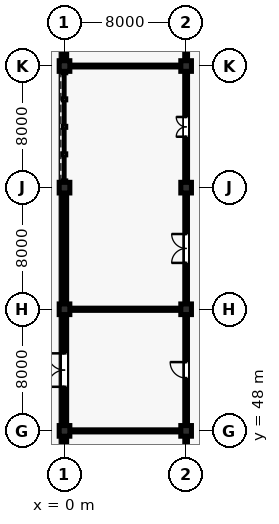
"""IFC4 building model, lengths in metres.
Left out: names, types, materials, properties, quantities, classifications, styles, units other than length and angle.
Written with IfcOpenShell. Run it as: python <this file> out.ifc"""

import sys

from ifc_helpers import new_model, si_unit, direction, frame, frame_2d, origin, origin_2d, place, context, subcontext, project, spatial, rectangle, extrude, element, fill, save


model = new_model("IFC4")
c1 = context("Model", 3, precision=1e-05, world=origin(), true_north=direction((0.0, 1.0)))
c2 = subcontext(c1, "Body", "Model", "MODEL_VIEW")
j1 = project(units=[si_unit("LENGTHUNIT", "METRE"), si_unit("PLANEANGLEUNIT", "RADIAN")], contexts=[c1])
p1 = place(None, origin())
s1 = spatial("IfcSite", under=j1, at=p1, CompositionType="ELEMENT")
p2 = place(p1, origin())
s2 = spatial("IfcBuilding", under=s1, at=p2, CompositionType="ELEMENT")
p3 = place(p2, origin())
s3 = spatial("IfcBuildingStorey", under=s2, at=p3, CompositionType="ELEMENT", Elevation=0.0)
for number, where, z_axis, x_axis in (
    (1, (0.0, 48.0, 0.0), (0.0, 0.0, 1.0), (1.0, 0.0, 0.0)),
    (2, (0.0, 56.0, 0.0), (0.0, 0.0, 1.0), (1.0, 0.0, 0.0)),
    (3, (0.0, 64.0, 0.0), (0.0, 0.0, 1.0), (1.0, 0.0, 0.0)),
    (4, (0.0, 72.0, 0.0), (0.0, 0.0, 1.0), (1.0, 0.0, 0.0)),
    (5, (8.0, 48.0, 0.0), (0.0, 0.0, 1.0), (1.0, 0.0, 0.0)),
    (6, (8.0, 56.0, 0.0), (0.0, 0.0, 1.0), (1.0, 0.0, 0.0)),
    (7, (8.0, 64.0, 0.0), (0.0, 0.0, 1.0), (1.0, 0.0, 0.0)),
    (8, (8.0, 72.0, 0.0), (0.0, 0.0, 1.0), (1.0, 0.0, 0.0)),
):
    element("IfcColumn", number, at=place(p3, frame(where, z_axis=z_axis, x_axis=x_axis)), inside=s3, PredefinedType="COLUMN", context=c2, shape_type="SweptSolid", body=[
        extrude(rectangle(XDim=0.7, YDim=0.7, at=origin_2d()), origin(), (0.0, 0.0, 1.0), 5.28),
    ])
p4 = place(p3, frame((0.0, 40.335, 0.0), z_axis=(0.0, 0.0, 1.0), x_axis=(0.0, 1.0, 0.0)))
e9 = element("IfcWall", 9, at=p4, inside=s3, PredefinedType="SOLIDWALL", context=c2, shape_type="SweptSolid", body=[
    extrude(rectangle(XDim=7.33, YDim=0.28, at=frame_2d((3.665, 0.0))), origin(), (0.0, 0.0, 1.0), 4.674),
])
p5 = place(p4, frame((3.09, 0.0, 0.0)))
e10 = element("IfcOpeningElement", 10, at=p5, cuts=e9, PredefinedType="OPENING", context=c2, shape_type="SweptSolid", body=[
    extrude(rectangle(XDim=1.15, YDim=2.2, at=frame_2d((0.575, 1.1))), frame((0.0, 0.15, 0.0), z_axis=(0.0, -1.0, 0.0), x_axis=(1.0, 0.0, 0.0)), (0.0, 0.0, 1.0), 0.3),
])
p6 = place(p3, frame((0.0, 48.335, 0.0), z_axis=(0.0, 0.0, 1.0), x_axis=(0.0, 1.0, 0.0)))
e11 = element("IfcWall", 11, at=p6, inside=s3, PredefinedType="SOLIDWALL", context=c2, shape_type="SweptSolid", body=[
    extrude(rectangle(XDim=7.33, YDim=0.28, at=frame_2d((3.665, 0.0))), origin(), (0.0, 0.0, 1.0), 4.614),
])
p7 = place(p6, frame((2.565, 0.0, 0.0)))
e12 = element("IfcOpeningElement", 12, at=p7, cuts=e11, PredefinedType="OPENING", context=c2, shape_type="SweptSolid", body=[
    extrude(rectangle(XDim=2.2, YDim=2.5, at=frame_2d((1.1, 1.25))), frame((0.0, 0.15, 0.0), z_axis=(0.0, -1.0, 0.0), x_axis=(1.0, 0.0, 0.0)), (0.0, 0.0, 1.0), 0.3),
])
p8 = place(p3, frame((0.0, 56.335, 0.0), z_axis=(0.0, 0.0, 1.0), x_axis=(0.0, 1.0, 0.0)))
e13 = element("IfcWall", 13, at=p8, inside=s3, PredefinedType="SOLIDWALL", context=c2, shape_type="SweptSolid", body=[
    extrude(rectangle(XDim=7.33, YDim=0.28, at=frame_2d((3.665, 0.0))), origin(), (0.0, 0.0, 1.0), 4.677),
])
p9 = place(p8, frame((2.515, 0.0, 0.9)))
e14 = element("IfcOpeningElement", 14, at=p9, cuts=e13, PredefinedType="OPENING", context=c2, shape_type="SweptSolid", body=[
    extrude(rectangle(XDim=2.3, YDim=2.55, at=frame_2d((1.15, 1.275))), frame((0.0, 0.15, 0.0), z_axis=(0.0, -1.0, 0.0), x_axis=(1.0, 0.0, 0.0)), (0.0, 0.0, 1.0), 0.3),
])
p10 = place(p3, frame((0.0, 72.335, 0.0), z_axis=(0.0, 0.0, 1.0), x_axis=(0.0, 1.0, 0.0)))
e15 = element("IfcWall", 15, at=p10, inside=s3, PredefinedType="SOLIDWALL", context=c2, shape_type="SweptSolid", body=[
    extrude(rectangle(XDim=7.305, YDim=0.28, at=frame_2d((3.652, 0.0))), origin(), (0.0, 0.0, 1.0), 4.674),
])
p11 = place(p10, frame((2.577, 0.0, 0.9)))
e16 = element("IfcOpeningElement", 16, at=p11, cuts=e15, PredefinedType="OPENING", context=c2, shape_type="SweptSolid", body=[
    extrude(rectangle(XDim=2.15, YDim=2.8, at=frame_2d((1.075, 1.4))), frame((0.0, 0.15, 0.0), z_axis=(0.0, -1.0, 0.0), x_axis=(1.0, 0.0, 0.0)), (0.0, 0.0, 1.0), 0.3),
])
p12 = place(p3, frame((8.0, 40.34, 0.0), z_axis=(0.0, 0.0, 1.0), x_axis=(0.0, 1.0, 0.0)))
e17 = element("IfcWall", 17, at=p12, inside=s3, PredefinedType="PARTITIONING", context=c2, shape_type="SweptSolid", body=[
    extrude(rectangle(XDim=7.32, YDim=0.175, at=frame_2d((3.66, 0.0))), origin(), (0.0, 0.0, 1.0), 4.404),
])
p13 = place(p12, frame((3.06, 0.0, 0.0)))
e18 = element("IfcOpeningElement", 18, at=p13, cuts=e17, PredefinedType="OPENING", context=c2, shape_type="SweptSolid", body=[
    extrude(rectangle(XDim=1.2, YDim=2.15, at=frame_2d((0.6, 1.075))), frame((0.0, 0.097, 0.0), z_axis=(0.0, -1.0, 0.0), x_axis=(1.0, 0.0, 0.0)), (0.0, 0.0, 1.0), 0.195),
])
p14 = place(p3, frame((0.34, 48.0, 0.0), z_axis=(0.0, 0.0, 1.0), x_axis=(1.0, 0.0, 0.0)))
e19 = element("IfcWall", 19, at=p14, inside=s3, PredefinedType="PARTITIONING", context=c2, shape_type="SweptSolid", body=[
    extrude(rectangle(XDim=7.32, YDim=0.135, at=frame_2d((3.66, 0.0))), origin(), (0.0, 0.0, 1.0), 4.336),
])
p15 = place(p3, frame((8.0, 48.34, 0.0), z_axis=(0.0, 0.0, 1.0), x_axis=(0.0, 1.0, 0.0)))
e20 = element("IfcWall", 20, at=p15, inside=s3, PredefinedType="PARTITIONING", context=c2, shape_type="SweptSolid", body=[
    extrude(rectangle(XDim=7.32, YDim=0.175, at=frame_2d((3.66, 0.0))), origin(), (0.0, 0.0, 1.0), 4.471),
])
p16 = place(p15, frame((3.135, 0.0, 0.0)))
e21 = element("IfcOpeningElement", 21, at=p16, cuts=e20, PredefinedType="OPENING", context=c2, shape_type="SweptSolid", body=[
    extrude(rectangle(XDim=1.05, YDim=2.15, at=frame_2d((0.525, 1.075))), frame((0.0, 0.097, 0.0), z_axis=(0.0, -1.0, 0.0), x_axis=(1.0, 0.0, 0.0)), (0.0, 0.0, 1.0), 0.195),
])
p17 = place(p3, frame((0.34, 56.0, 0.0), z_axis=(0.0, 0.0, 1.0), x_axis=(1.0, 0.0, 0.0)))
e22 = element("IfcWall", 22, at=p17, inside=s3, PredefinedType="PARTITIONING", context=c2, shape_type="SweptSolid", body=[
    extrude(rectangle(XDim=7.32, YDim=0.142, at=frame_2d((3.66, 0.0))), origin(), (0.0, 0.0, 1.0), 4.404),
])
p18 = place(p3, frame((8.0, 56.34, 0.0), z_axis=(0.0, 0.0, 1.0), x_axis=(0.0, 1.0, 0.0)))
e23 = element("IfcWall", 23, at=p18, inside=s3, PredefinedType="PARTITIONING", context=c2, shape_type="SweptSolid", body=[
    extrude(rectangle(XDim=7.32, YDim=0.175, at=frame_2d((3.66, 0.0))), origin(), (0.0, 0.0, 1.0), 4.403),
])
p19 = place(p18, frame((2.71, 0.0, 0.0)))
e24 = element("IfcOpeningElement", 24, at=p19, cuts=e23, PredefinedType="OPENING", context=c2, shape_type="SweptSolid", body=[
    extrude(rectangle(XDim=1.9, YDim=2.38, at=frame_2d((0.95, 1.19))), frame((0.0, 0.097, 0.0), z_axis=(0.0, -1.0, 0.0), x_axis=(1.0, 0.0, 0.0)), (0.0, 0.0, 1.0), 0.195),
])
p20 = place(p3, frame((8.0, 64.34, 0.0), z_axis=(0.0, 0.0, 1.0), x_axis=(0.0, 1.0, 0.0)))
e25 = element("IfcWall", 25, at=p20, inside=s3, PredefinedType="PARTITIONING", context=c2, shape_type="SweptSolid", body=[
    extrude(rectangle(XDim=7.32, YDim=0.185, at=frame_2d((3.66, 0.0))), origin(), (0.0, 0.0, 1.0), 4.412),
])
p21 = place(p20, frame((3.01, 0.0, 0.0)))
e26 = element("IfcOpeningElement", 26, at=p21, cuts=e25, PredefinedType="OPENING", context=c2, shape_type="SweptSolid", body=[
    extrude(rectangle(XDim=1.3, YDim=2.2, at=frame_2d((0.65, 1.1))), frame((0.0, 0.103, 0.0), z_axis=(0.0, -1.0, 0.0), x_axis=(1.0, 0.0, 0.0)), (0.0, 0.0, 1.0), 0.205),
])
p22 = place(p3, frame((0.34, 72.0, 0.0), z_axis=(0.0, 0.0, 1.0), x_axis=(1.0, 0.0, 0.0)))
e27 = element("IfcWall", 27, at=p22, inside=s3, PredefinedType="PARTITIONING", context=c2, shape_type="SweptSolid", body=[
    extrude(rectangle(XDim=7.32, YDim=0.12, at=frame_2d((3.66, 0.0))), origin(), (0.0, 0.0, 1.0), 4.403),
])
p23 = place(p3, frame((8.0, 72.34, 0.0), z_axis=(0.0, 0.0, 1.0), x_axis=(0.0, 1.0, 0.0)))
e28 = element("IfcWall", 28, at=p23, inside=s3, PredefinedType="PARTITIONING", context=c2, shape_type="SweptSolid", body=[
    extrude(rectangle(XDim=7.295, YDim=0.185, at=frame_2d((3.647, 0.0))), origin(), (0.0, 0.0, 1.0), 4.404),
])
p24 = place(p23, frame((3.127, 0.0, 0.0)))
e29 = element("IfcOpeningElement", 29, at=p24, cuts=e28, PredefinedType="OPENING", context=c2, shape_type="SweptSolid", body=[
    extrude(rectangle(XDim=1.04, YDim=2.18, at=frame_2d((0.52, 1.09))), frame((0.0, 0.103, 0.0), z_axis=(0.0, -1.0, 0.0), x_axis=(1.0, 0.0, 0.0)), (0.0, 0.0, 1.0), 0.205),
])
p25 = place(p7, origin())
e30 = element("IfcDoor", 30, at=p25, inside=s3, OperationType="DOUBLE_DOOR_SINGLE_SWING", PredefinedType="DOOR", context=c2, shape_type="SweptSolid", body=[
    extrude(rectangle(XDim=2.2, YDim=2.5, at=frame_2d((1.1, 1.25))), frame((0.0, 0.025, 0.0), z_axis=(0.0, -1.0, 0.0), x_axis=(1.0, 0.0, 0.0)), (0.0, 0.0, 1.0), 0.05),
])
fill(e12, e30)
p26 = place(p9, origin())
e31 = element("IfcWindow", 31, at=p26, inside=s3, PartitioningType="SINGLE_PANEL", PredefinedType="WINDOW", context=c2, shape_type="SweptSolid", body=[
    extrude(rectangle(XDim=2.3, YDim=2.55, at=frame_2d((1.15, 1.275))), frame((0.0, 0.03, 0.0), z_axis=(0.0, -1.0, 0.0), x_axis=(1.0, 0.0, 0.0)), (0.0, 0.0, 1.0), 0.06),
])
fill(e14, e31)
p27 = place(p16, origin())
e32 = element("IfcDoor", 32, at=p27, inside=s3, OperationType="SINGLE_SWING_RIGHT", PredefinedType="DOOR", context=c2, shape_type="SweptSolid", body=[
    extrude(rectangle(XDim=1.05, YDim=2.15, at=frame_2d((0.525, 1.075))), frame((0.0, 0.025, 0.0), z_axis=(0.0, -1.0, 0.0), x_axis=(1.0, 0.0, 0.0)), (0.0, 0.0, 1.0), 0.05),
])
fill(e21, e32)
p28 = place(p19, origin())
e33 = element("IfcDoor", 33, at=p28, inside=s3, OperationType="DOUBLE_DOOR_SINGLE_SWING", PredefinedType="DOOR", context=c2, shape_type="SweptSolid", body=[
    extrude(rectangle(XDim=1.9, YDim=2.38, at=frame_2d((0.95, 1.19))), frame((0.0, 0.025, 0.0), z_axis=(0.0, -1.0, 0.0), x_axis=(1.0, 0.0, 0.0)), (0.0, 0.0, 1.0), 0.05),
])
fill(e24, e33)
p29 = place(p21, origin())
e34 = element("IfcDoor", 34, at=p29, inside=s3, OperationType="DOUBLE_DOOR_SINGLE_SWING", PredefinedType="DOOR", context=c2, shape_type="SweptSolid", body=[
    extrude(rectangle(XDim=1.3, YDim=2.2, at=frame_2d((0.65, 1.1))), frame((0.0, 0.025, 0.0), z_axis=(0.0, -1.0, 0.0), x_axis=(1.0, 0.0, 0.0)), (0.0, 0.0, 1.0), 0.05),
])
fill(e26, e34)
save(model, sys.argv[1])
